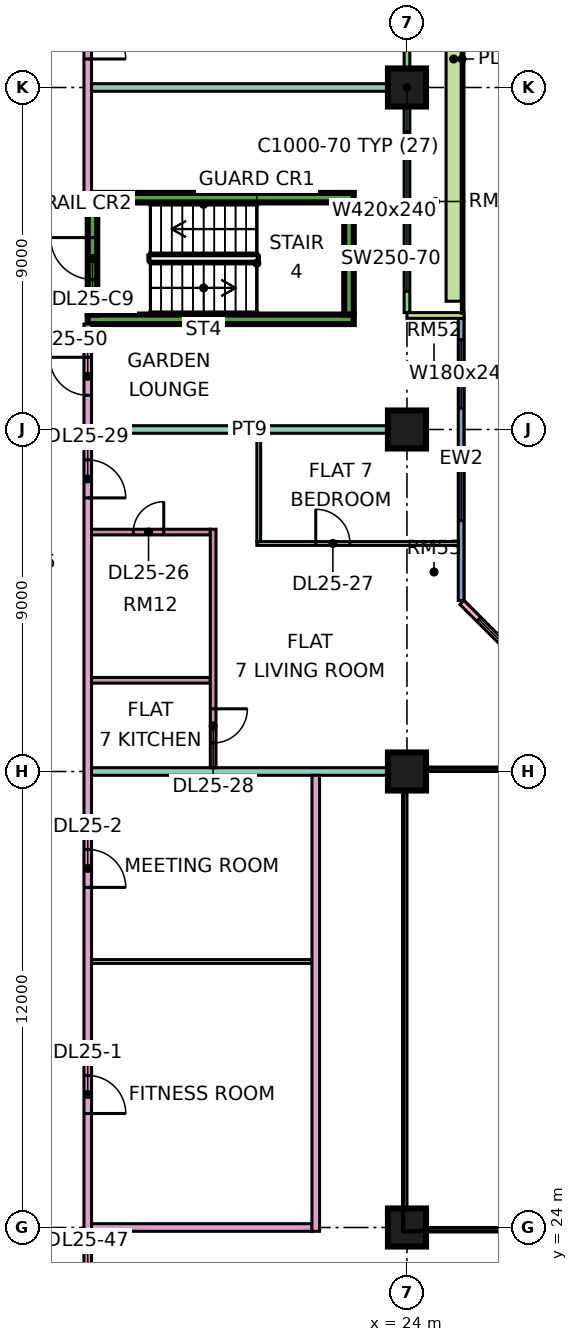
"""IFC4 building model, lengths in metres.
Left out: names, types, materials, properties, quantities, classifications, styles, units other than length and angle.
Written with IfcOpenShell. Run it as: python <this file> out.ifc"""

import sys

from ifc_helpers import new_model, si_unit, direction, frame, frame_2d, origin, origin_2d, place, context, subcontext, project, spatial, rectangle, extrude, element, fill, save


model = new_model("IFC4")
c1 = context("Model", 3, precision=1e-05, world=origin(), true_north=direction((0.0, 1.0)))
c2 = subcontext(c1, "Body", "Model", "MODEL_VIEW")
j1 = project(units=[si_unit("LENGTHUNIT", "METRE"), si_unit("PLANEANGLEUNIT", "RADIAN")], contexts=[c1])
p1 = place(None, origin())
s1 = spatial("IfcSite", under=j1, at=p1, CompositionType="ELEMENT")
p2 = place(p1, origin())
s2 = spatial("IfcBuilding", under=s1, at=p2, CompositionType="ELEMENT")
p3 = place(p2, frame((0.0, 0.0, 110.65)))
s3 = spatial("IfcBuildingStorey", under=s2, at=p3, CompositionType="ELEMENT", Elevation=110.65)
for number, where, z_axis, x_axis in (
    (1, (24.0, 24.0, 0.0), (0.0, 0.0, 1.0), (1.0, 0.0, 0.0)),
    (2, (24.0, 36.0, 0.0), (0.0, 0.0, 1.0), (1.0, 0.0, 0.0)),
    (3, (24.0, 45.0, 0.0), (0.0, 0.0, 1.0), (1.0, 0.0, 0.0)),
    (4, (24.0, 54.0, 0.0), (0.0, 0.0, 1.0), (1.0, 0.0, 0.0)),
):
    element("IfcColumn", number, at=place(p3, frame(where, z_axis=z_axis, x_axis=x_axis)), inside=s3, PredefinedType="COLUMN", context=c2, shape_type="SweptSolid", body=[
        extrude(rectangle(XDim=1.0, YDim=1.0, at=origin_2d()), origin(), (0.0, 0.0, 1.0), 3.75),
    ])
for number, where, z_axis, x_axis in (
    (5, (15.6, 47.9, 0.0), (0.0, 0.0, 1.0), (1.0, 0.0, 0.0)),
    (6, (15.6, 51.1, 0.0), (0.0, 0.0, 1.0), (1.0, 0.0, 0.0)),
):
    element("IfcWall", number, at=place(p3, frame(where, z_axis=z_axis, x_axis=x_axis)), inside=s3, PredefinedType="SHEAR", context=c2, shape_type="SweptSolid", body=[
        extrude(rectangle(XDim=7.0, YDim=0.25, at=frame_2d((3.5, 0.0))), origin(), (0.0, 0.0, 1.0), 3.75),
    ])
p4 = place(p3, frame((15.725, 48.025, 0.0), z_axis=(0.0, 0.0, 1.0), x_axis=(0.0, 1.0, 0.0)))
e7 = element("IfcWall", 7, at=p4, inside=s3, PredefinedType="SHEAR", context=c2, shape_type="SweptSolid", body=[
    extrude(rectangle(XDim=2.95, YDim=0.25, at=frame_2d((1.475, 0.0))), origin(), (0.0, 0.0, 1.0), 3.75),
])
p5 = place(p4, frame((0.925, 0.0, 0.0)))
e8 = element("IfcOpeningElement", 8, at=p5, cuts=e7, PredefinedType="OPENING", context=c2, shape_type="SweptSolid", body=[
    extrude(rectangle(XDim=1.1, YDim=2.2, at=frame_2d((0.55, 1.1))), frame((0.0, 0.135, 0.0), z_axis=(0.0, -1.0, 0.0), x_axis=(1.0, 0.0, 0.0)), (0.0, 0.0, 1.0), 0.27),
])
p6 = place(p3, frame((22.475, 48.025, 0.0), z_axis=(0.0, 0.0, 1.0), x_axis=(0.0, 1.0, 0.0)))
e9 = element("IfcWall", 9, at=p6, inside=s3, PredefinedType="SHEAR", context=c2, shape_type="SweptSolid", body=[
    extrude(rectangle(XDim=2.95, YDim=0.25, at=frame_2d((1.475, 0.0))), origin(), (0.0, 0.0, 1.0), 3.75),
])
p7 = place(p3, frame((28.447, 37.447, 0.0), z_axis=(0.0, 0.0, 1.0), x_axis=(-0.707106781187, 0.707106781187, 0.0)))
e10 = element("IfcWall", 10, at=p7, inside=s3, PredefinedType="SOLIDWALL", context=c2, shape_type="SweptSolid", body=[
    extrude(rectangle(XDim=4.243, YDim=0.15, at=frame_2d((2.121, 0.0))), origin(), (0.0, 0.0, 1.0), 3.35),
])
p8 = place(p7, frame((0.621, 0.0, 0.45)))
e11 = element("IfcOpeningElement", 11, at=p8, cuts=e10, PredefinedType="OPENING", context=c2, shape_type="SweptSolid", body=[
    extrude(rectangle(XDim=3.0, YDim=2.4, at=frame_2d((1.5, 1.2))), frame((0.0, 0.085, 0.0), z_axis=(0.0, -1.0, 0.0), x_axis=(1.0, 0.0, 0.0)), (0.0, 0.0, 1.0), 0.17),
])
p9 = place(p3, frame((25.425, 40.5, 0.0), z_axis=(0.0, 0.0, 1.0), x_axis=(0.0, 1.0, 0.0)))
e12 = element("IfcWall", 12, at=p9, inside=s3, PredefinedType="SOLIDWALL", context=c2, shape_type="SweptSolid", body=[
    extrude(rectangle(XDim=7.425, YDim=0.15, at=frame_2d((3.712, 0.0))), origin(), (0.0, 0.0, 1.0), 3.35),
])
p10 = place(p9, frame((2.1, 0.0, 0.45)))
e13 = element("IfcOpeningElement", 13, at=p10, cuts=e12, PredefinedType="OPENING", context=c2, shape_type="SweptSolid", body=[
    extrude(rectangle(XDim=1.8, YDim=2.4, at=frame_2d((0.9, 1.2))), frame((0.0, 0.085, 0.0), z_axis=(0.0, -1.0, 0.0), x_axis=(1.0, 0.0, 0.0)), (0.0, 0.0, 1.0), 0.17),
])
p11 = place(p9, frame((5.062, 0.0, 0.45)))
e14 = element("IfcOpeningElement", 14, at=p11, cuts=e12, PredefinedType="OPENING", context=c2, shape_type="SweptSolid", body=[
    extrude(rectangle(XDim=1.8, YDim=2.4, at=frame_2d((0.9, 1.2))), frame((0.0, 0.085, 0.0), z_axis=(0.0, -1.0, 0.0), x_axis=(1.0, 0.0, 0.0)), (0.0, 0.0, 1.0), 0.17),
])
p12 = place(p3, frame((24.0, 48.075, 0.0), z_axis=(0.0, 0.0, 1.0), x_axis=(0.0, 1.0, 0.0)))
e15 = element("IfcWall", 15, at=p12, inside=s3, PredefinedType="SOLIDWALL", context=c2, shape_type="SweptSolid", body=[
    extrude(rectangle(XDim=13.35, YDim=0.15, at=frame_2d((6.675, 0.0))), origin(), (0.0, 0.0, 1.0), 3.35),
])
p13 = place(p12, frame((0.562, 0.0, 0.45)))
e16 = element("IfcOpeningElement", 16, at=p13, cuts=e15, PredefinedType="OPENING", context=c2, shape_type="SweptSolid", body=[
    extrude(rectangle(XDim=4.2, YDim=2.4, at=frame_2d((2.1, 1.2))), frame((0.0, 0.085, 0.0), z_axis=(0.0, -1.0, 0.0), x_axis=(1.0, 0.0, 0.0)), (0.0, 0.0, 1.0), 0.17),
])
p14 = place(p12, frame((8.325, 0.0, 0.0)))
e17 = element("IfcOpeningElement", 17, at=p14, cuts=e15, PredefinedType="OPENING", context=c2, shape_type="SweptSolid", body=[
    extrude(rectangle(XDim=1.8, YDim=2.4, at=frame_2d((0.9, 1.2))), frame((0.0, 0.085, 0.0), z_axis=(0.0, -1.0, 0.0), x_axis=(1.0, 0.0, 0.0)), (0.0, 0.0, 1.0), 0.17),
])
p15 = place(p12, frame((12.188, 0.0, 0.45)))
e18 = element("IfcOpeningElement", 18, at=p15, cuts=e15, PredefinedType="OPENING", context=c2, shape_type="SweptSolid", body=[
    extrude(rectangle(XDim=0.9, YDim=2.4, at=frame_2d((0.45, 1.2))), frame((0.0, 0.085, 0.0), z_axis=(0.0, -1.0, 0.0), x_axis=(1.0, 0.0, 0.0)), (0.0, 0.0, 1.0), 0.17),
])
p16 = place(p3, frame((25.5, 48.0, 0.0), z_axis=(0.0, 0.0, 1.0), x_axis=(-1.0, 0.0, 0.0)))
e19 = element("IfcWall", 19, at=p16, inside=s3, PredefinedType="SOLIDWALL", context=c2, shape_type="SweptSolid", body=[
    extrude(rectangle(XDim=1.5, YDim=0.15, at=frame_2d((0.75, 0.0))), origin(), (0.0, 0.0, 1.0), 3.35),
])
p17 = place(p3, frame((25.229, 48.375, 0.0), z_axis=(0.0, 0.0, 1.0), x_axis=(0.0, 1.0, 0.0)))
e20 = element("IfcWall", 20, at=p17, inside=s3, PredefinedType="SOLIDWALL", context=c2, shape_type="SweptSolid", body=[
    extrude(rectangle(XDim=12.75, YDim=0.4, at=frame_2d((6.375, 0.0))), origin(), (0.0, 0.0, 1.0), 0.7),
])
p18 = place(p3, frame((15.6, 20.0, 0.0), z_axis=(0.0, 0.0, 1.0), x_axis=(0.0, 1.0, 0.0)))
e21 = element("IfcWall", 21, at=p18, inside=s3, PredefinedType="PARTITIONING", context=c2, shape_type="SweptSolid", body=[
    extrude(rectangle(XDim=27.775, YDim=0.2, at=frame_2d((13.887, 0.0))), origin(), (0.0, 0.0, 1.0), 3.35),
])
p19 = place(p18, frame((7.0, 0.0, 0.0)))
e22 = element("IfcOpeningElement", 22, at=p19, cuts=e21, PredefinedType="OPENING", context=c2, shape_type="SweptSolid", body=[
    extrude(rectangle(XDim=1.0, YDim=2.1, at=frame_2d((0.5, 1.05))), frame((0.0, 0.11, 0.0), z_axis=(0.0, -1.0, 0.0), x_axis=(1.0, 0.0, 0.0)), (0.0, 0.0, 1.0), 0.22),
])
p20 = place(p18, frame((12.95, 0.0, 0.0)))
e23 = element("IfcOpeningElement", 23, at=p20, cuts=e21, PredefinedType="OPENING", context=c2, shape_type="SweptSolid", body=[
    extrude(rectangle(XDim=1.0, YDim=2.1, at=frame_2d((0.5, 1.05))), frame((0.0, 0.11, 0.0), z_axis=(0.0, -1.0, 0.0), x_axis=(1.0, 0.0, 0.0)), (0.0, 0.0, 1.0), 0.22),
])
p21 = place(p18, frame((23.2, 0.0, 0.0)))
e24 = element("IfcOpeningElement", 24, at=p21, cuts=e21, PredefinedType="OPENING", context=c2, shape_type="SweptSolid", body=[
    extrude(rectangle(XDim=1.0, YDim=2.1, at=frame_2d((0.5, 1.05))), frame((0.0, 0.11, 0.0), z_axis=(0.0, -1.0, 0.0), x_axis=(1.0, 0.0, 0.0)), (0.0, 0.0, 1.0), 0.22),
])
p22 = place(p18, frame((1.15, 0.0, 0.0)))
e25 = element("IfcOpeningElement", 25, at=p22, cuts=e21, PredefinedType="OPENING", context=c2, shape_type="SweptSolid", body=[
    extrude(rectangle(XDim=1.8, YDim=2.1, at=frame_2d((0.9, 1.05))), frame((0.0, 0.11, 0.0), z_axis=(0.0, -1.0, 0.0), x_axis=(1.0, 0.0, 0.0)), (0.0, 0.0, 1.0), 0.22),
])
p23 = place(p18, frame((25.9, 0.0, 0.0)))
e26 = element("IfcOpeningElement", 26, at=p23, cuts=e21, PredefinedType="OPENING", context=c2, shape_type="SweptSolid", body=[
    extrude(rectangle(XDim=1.0, YDim=2.1, at=frame_2d((0.5, 1.05))), frame((0.0, 0.11, 0.0), z_axis=(0.0, -1.0, 0.0), x_axis=(1.0, 0.0, 0.0)), (0.0, 0.0, 1.0), 0.22),
])
p24 = place(p3, frame((15.6, 51.225, 0.0), z_axis=(0.0, 0.0, 1.0), x_axis=(0.0, 1.0, 0.0)))
e27 = element("IfcWall", 27, at=p24, inside=s3, PredefinedType="PARTITIONING", context=c2, shape_type="SweptSolid", body=[
    extrude(rectangle(XDim=13.125, YDim=0.2, at=frame_2d((6.562, 0.0))), origin(), (0.0, 0.0, 1.0), 3.35),
])
p25 = place(p24, frame((3.525, 0.0, 0.0)))
e28 = element("IfcOpeningElement", 28, at=p25, cuts=e27, PredefinedType="OPENING", context=c2, shape_type="SweptSolid", body=[
    extrude(rectangle(XDim=1.0, YDim=2.1, at=frame_2d((0.5, 1.05))), frame((0.0, 0.11, 0.0), z_axis=(0.0, -1.0, 0.0), x_axis=(1.0, 0.0, 0.0)), (0.0, 0.0, 1.0), 0.22),
])
p26 = place(p3, frame((15.7, 24.0, 0.0), z_axis=(0.0, 0.0, 1.0), x_axis=(1.0, 0.0, 0.0)))
e29 = element("IfcWall", 29, at=p26, inside=s3, PredefinedType="PARTITIONING", context=c2, shape_type="SweptSolid", body=[
    extrude(rectangle(XDim=5.8, YDim=0.2, at=frame_2d((2.9, 0.0))), origin(), (0.0, 0.0, 1.0), 3.35),
])
p27 = place(p3, frame((15.7, 31.0, 0.0), z_axis=(0.0, 0.0, 1.0), x_axis=(1.0, 0.0, 0.0)))
e30 = element("IfcWall", 30, at=p27, inside=s3, PredefinedType="PARTITIONING", context=c2, shape_type="SweptSolid", body=[
    extrude(rectangle(XDim=5.8, YDim=0.1, at=frame_2d((2.9, 0.0))), origin(), (0.0, 0.0, 1.0), 3.35),
])
p28 = place(p3, frame((15.7, 36.0, 0.0), z_axis=(0.0, 0.0, 1.0), x_axis=(1.0, 0.0, 0.0)))
e31 = element("IfcWall", 31, at=p28, inside=s3, PredefinedType="PARTITIONING", context=c2, shape_type="SweptSolid", body=[
    extrude(rectangle(XDim=8.3, YDim=0.2, at=frame_2d((4.15, 0.0))), origin(), (0.0, 0.0, 1.0), 3.35),
])
p29 = place(p3, frame((15.7, 38.4, 0.0), z_axis=(0.0, 0.0, 1.0), x_axis=(1.0, 0.0, 0.0)))
e32 = element("IfcWall", 32, at=p29, inside=s3, PredefinedType="PARTITIONING", context=c2, shape_type="SweptSolid", body=[
    extrude(rectangle(XDim=3.125, YDim=0.15, at=frame_2d((1.562, 0.0))), origin(), (0.0, 0.0, 1.0), 3.35),
])
p30 = place(p3, frame((15.7, 42.3, 0.0), z_axis=(0.0, 0.0, 1.0), x_axis=(1.0, 0.0, 0.0)))
e33 = element("IfcWall", 33, at=p30, inside=s3, PredefinedType="PARTITIONING", context=c2, shape_type="SweptSolid", body=[
    extrude(rectangle(XDim=3.125, YDim=0.15, at=frame_2d((1.562, 0.0))), origin(), (0.0, 0.0, 1.0), 3.35),
])
p31 = place(p30, frame((1.1, 0.0, 0.0)))
e34 = element("IfcOpeningElement", 34, at=p31, cuts=e33, PredefinedType="OPENING", context=c2, shape_type="SweptSolid", body=[
    extrude(rectangle(XDim=0.8, YDim=2.1, at=frame_2d((0.4, 1.05))), frame((0.0, 0.085, 0.0), z_axis=(0.0, -1.0, 0.0), x_axis=(1.0, 0.0, 0.0)), (0.0, 0.0, 1.0), 0.17),
])
p32 = place(p3, frame((15.7, 45.0, 0.0), z_axis=(0.0, 0.0, 1.0), x_axis=(1.0, 0.0, 0.0)))
e35 = element("IfcWall", 35, at=p32, inside=s3, PredefinedType="PARTITIONING", context=c2, shape_type="SweptSolid", body=[
    extrude(rectangle(XDim=8.3, YDim=0.2, at=frame_2d((4.15, 0.0))), origin(), (0.0, 0.0, 1.0), 3.35),
])
p33 = place(p3, frame((15.7, 54.0, 0.0), z_axis=(0.0, 0.0, 1.0), x_axis=(1.0, 0.0, 0.0)))
e36 = element("IfcWall", 36, at=p33, inside=s3, PredefinedType="PARTITIONING", context=c2, shape_type="SweptSolid", body=[
    extrude(rectangle(XDim=8.226, YDim=0.2, at=frame_2d((4.113, 0.0))), origin(), (0.0, 0.0, 1.0), 3.35),
])
p34 = place(p3, frame((18.9, 36.1, 0.0), z_axis=(0.0, 0.0, 1.0), x_axis=(0.0, 1.0, 0.0)))
e37 = element("IfcWall", 37, at=p34, inside=s3, PredefinedType="PARTITIONING", context=c2, shape_type="SweptSolid", body=[
    extrude(rectangle(XDim=6.275, YDim=0.15, at=frame_2d((3.137, 0.0))), origin(), (0.0, 0.0, 1.0), 3.35),
])
p35 = place(p34, frame((0.65, 0.0, 0.0)))
e38 = element("IfcOpeningElement", 38, at=p35, cuts=e37, PredefinedType="OPENING", context=c2, shape_type="SweptSolid", body=[
    extrude(rectangle(XDim=0.9, YDim=2.1, at=frame_2d((0.45, 1.05))), frame((0.0, 0.085, 0.0), z_axis=(0.0, -1.0, 0.0), x_axis=(1.0, 0.0, 0.0)), (0.0, 0.0, 1.0), 0.17),
])
p36 = place(p3, frame((20.05, 42.0, 0.0), z_axis=(0.0, 0.0, 1.0), x_axis=(1.0, 0.0, 0.0)))
e39 = element("IfcWall", 39, at=p36, inside=s3, PredefinedType="PARTITIONING", context=c2, shape_type="SweptSolid", body=[
    extrude(rectangle(XDim=5.3, YDim=0.1, at=frame_2d((2.65, 0.0))), origin(), (0.0, 0.0, 1.0), 3.35),
])
p37 = place(p36, frame((1.55, 0.0, 0.0)))
e40 = element("IfcOpeningElement", 40, at=p37, cuts=e39, PredefinedType="OPENING", context=c2, shape_type="SweptSolid", body=[
    extrude(rectangle(XDim=0.9, YDim=2.1, at=frame_2d((0.45, 1.05))), frame((0.0, 0.06, 0.0), z_axis=(0.0, -1.0, 0.0), x_axis=(1.0, 0.0, 0.0)), (0.0, 0.0, 1.0), 0.12),
])
p38 = place(p3, frame((20.1, 42.05, 0.0), z_axis=(0.0, 0.0, 1.0), x_axis=(0.0, 1.0, 0.0)))
e41 = element("IfcWall", 41, at=p38, inside=s3, PredefinedType="PARTITIONING", context=c2, shape_type="SweptSolid", body=[
    extrude(rectangle(XDim=2.85, YDim=0.1, at=frame_2d((1.425, 0.0))), origin(), (0.0, 0.0, 1.0), 3.35),
])
p39 = place(p3, frame((21.6, 23.9, 0.0), z_axis=(0.0, 0.0, 1.0), x_axis=(0.0, 1.0, 0.0)))
e42 = element("IfcWall", 42, at=p39, inside=s3, PredefinedType="PARTITIONING", context=c2, shape_type="SweptSolid", body=[
    extrude(rectangle(XDim=12.0, YDim=0.2, at=frame_2d((6.0, 0.0))), origin(), (0.0, 0.0, 1.0), 3.35),
])
p40 = place(p8, origin())
e43 = element("IfcWindow", 43, at=p40, inside=s3, PartitioningType="SINGLE_PANEL", PredefinedType="WINDOW", context=c2, shape_type="SweptSolid", body=[
    extrude(rectangle(XDim=3.0, YDim=2.4, at=frame_2d((1.5, 1.2))), frame((0.0, 0.03, 0.0), z_axis=(0.0, -1.0, 0.0), x_axis=(1.0, 0.0, 0.0)), (0.0, 0.0, 1.0), 0.06),
])
fill(e11, e43)
p41 = place(p10, origin())
e44 = element("IfcWindow", 44, at=p41, inside=s3, PartitioningType="SINGLE_PANEL", PredefinedType="WINDOW", context=c2, shape_type="SweptSolid", body=[
    extrude(rectangle(XDim=1.8, YDim=2.4, at=frame_2d((0.9, 1.2))), frame((0.0, 0.03, 0.0), z_axis=(0.0, -1.0, 0.0), x_axis=(1.0, 0.0, 0.0)), (0.0, 0.0, 1.0), 0.06),
])
fill(e13, e44)
p42 = place(p11, origin())
e45 = element("IfcWindow", 45, at=p42, inside=s3, PartitioningType="SINGLE_PANEL", PredefinedType="WINDOW", context=c2, shape_type="SweptSolid", body=[
    extrude(rectangle(XDim=1.8, YDim=2.4, at=frame_2d((0.9, 1.2))), frame((0.0, 0.03, 0.0), z_axis=(0.0, -1.0, 0.0), x_axis=(1.0, 0.0, 0.0)), (0.0, 0.0, 1.0), 0.06),
])
fill(e14, e45)
p43 = place(p13, origin())
e46 = element("IfcWindow", 46, at=p43, inside=s3, PartitioningType="SINGLE_PANEL", PredefinedType="WINDOW", context=c2, shape_type="SweptSolid", body=[
    extrude(rectangle(XDim=4.2, YDim=2.4, at=frame_2d((2.1, 1.2))), frame((0.0, 0.03, 0.0), z_axis=(0.0, -1.0, 0.0), x_axis=(1.0, 0.0, 0.0)), (0.0, 0.0, 1.0), 0.06),
])
fill(e16, e46)
p44 = place(p5, frame((1.1, 0.0, 0.0), z_axis=(0.0, 0.0, 1.0), x_axis=(-1.0, 0.0, 0.0)))
e47 = element("IfcDoor", 47, at=p44, inside=s3, OperationType="SINGLE_SWING_RIGHT", PredefinedType="DOOR", context=c2, shape_type="SweptSolid", body=[
    extrude(rectangle(XDim=1.1, YDim=2.2, at=frame_2d((0.55, 1.1))), frame((0.0, 0.025, 0.0), z_axis=(0.0, -1.0, 0.0), x_axis=(1.0, 0.0, 0.0)), (0.0, 0.0, 1.0), 0.05),
])
fill(e8, e47)
p45 = place(p19, frame((1.0, 0.0, 0.0), z_axis=(0.0, 0.0, 1.0), x_axis=(-1.0, 0.0, 0.0)))
e48 = element("IfcDoor", 48, at=p45, inside=s3, OperationType="SINGLE_SWING_LEFT", PredefinedType="DOOR", context=c2, shape_type="SweptSolid", body=[
    extrude(rectangle(XDim=1.0, YDim=2.1, at=frame_2d((0.5, 1.05))), frame((0.0, 0.025, 0.0), z_axis=(0.0, -1.0, 0.0), x_axis=(1.0, 0.0, 0.0)), (0.0, 0.0, 1.0), 0.05),
])
fill(e22, e48)
p46 = place(p20, frame((1.0, 0.0, 0.0), z_axis=(0.0, 0.0, 1.0), x_axis=(-1.0, 0.0, 0.0)))
e49 = element("IfcDoor", 49, at=p46, inside=s3, OperationType="SINGLE_SWING_LEFT", PredefinedType="DOOR", context=c2, shape_type="SweptSolid", body=[
    extrude(rectangle(XDim=1.0, YDim=2.1, at=frame_2d((0.5, 1.05))), frame((0.0, 0.025, 0.0), z_axis=(0.0, -1.0, 0.0), x_axis=(1.0, 0.0, 0.0)), (0.0, 0.0, 1.0), 0.05),
])
fill(e23, e49)
p47 = place(p31, frame((0.8, 0.0, 0.0), z_axis=(0.0, 0.0, 1.0), x_axis=(-1.0, 0.0, 0.0)))
e50 = element("IfcDoor", 50, at=p47, inside=s3, OperationType="SINGLE_SWING_RIGHT", PredefinedType="DOOR", context=c2, shape_type="SweptSolid", body=[
    extrude(rectangle(XDim=0.8, YDim=2.1, at=frame_2d((0.4, 1.05))), frame((0.0, 0.025, 0.0), z_axis=(0.0, -1.0, 0.0), x_axis=(1.0, 0.0, 0.0)), (0.0, 0.0, 1.0), 0.05),
])
fill(e34, e50)
p48 = place(p37, origin())
e51 = element("IfcDoor", 51, at=p48, inside=s3, OperationType="SINGLE_SWING_LEFT", PredefinedType="DOOR", context=c2, shape_type="SweptSolid", body=[
    extrude(rectangle(XDim=0.9, YDim=2.1, at=frame_2d((0.45, 1.05))), frame((0.0, 0.025, 0.0), z_axis=(0.0, -1.0, 0.0), x_axis=(1.0, 0.0, 0.0)), (0.0, 0.0, 1.0), 0.05),
])
fill(e40, e51)
p49 = place(p35, origin())
e52 = element("IfcDoor", 52, at=p49, inside=s3, OperationType="SINGLE_SWING_RIGHT", PredefinedType="DOOR", context=c2, shape_type="SweptSolid", body=[
    extrude(rectangle(XDim=0.9, YDim=2.1, at=frame_2d((0.45, 1.05))), frame((0.0, 0.025, 0.0), z_axis=(0.0, -1.0, 0.0), x_axis=(1.0, 0.0, 0.0)), (0.0, 0.0, 1.0), 0.05),
])
fill(e38, e52)
p50 = place(p21, frame((1.0, 0.0, 0.0), z_axis=(0.0, 0.0, 1.0), x_axis=(-1.0, 0.0, 0.0)))
e53 = element("IfcDoor", 53, at=p50, inside=s3, OperationType="SINGLE_SWING_LEFT", PredefinedType="DOOR", context=c2, shape_type="SweptSolid", body=[
    extrude(rectangle(XDim=1.0, YDim=2.1, at=frame_2d((0.5, 1.05))), frame((0.0, 0.025, 0.0), z_axis=(0.0, -1.0, 0.0), x_axis=(1.0, 0.0, 0.0)), (0.0, 0.0, 1.0), 0.05),
])
fill(e24, e53)
p51 = place(p25, frame((1.0, 0.0, 0.0), z_axis=(0.0, 0.0, 1.0), x_axis=(-1.0, 0.0, 0.0)))
e54 = element("IfcDoor", 54, at=p51, inside=s3, OperationType="SINGLE_SWING_LEFT", PredefinedType="DOOR", context=c2, shape_type="SweptSolid", body=[
    extrude(rectangle(XDim=1.0, YDim=2.1, at=frame_2d((0.5, 1.05))), frame((0.0, 0.025, 0.0), z_axis=(0.0, -1.0, 0.0), x_axis=(1.0, 0.0, 0.0)), (0.0, 0.0, 1.0), 0.05),
])
fill(e28, e54)
p52 = place(p23, frame((1.0, 0.0, 0.0), z_axis=(0.0, 0.0, 1.0), x_axis=(-1.0, 0.0, 0.0)))
e55 = element("IfcDoor", 55, at=p52, inside=s3, OperationType="SINGLE_SWING_RIGHT", PredefinedType="DOOR", context=c2, shape_type="SweptSolid", body=[
    extrude(rectangle(XDim=1.0, YDim=2.1, at=frame_2d((0.5, 1.05))), frame((0.0, 0.025, 0.0), z_axis=(0.0, -1.0, 0.0), x_axis=(1.0, 0.0, 0.0)), (0.0, 0.0, 1.0), 0.05),
])
fill(e26, e55)
save(model, sys.argv[1])
